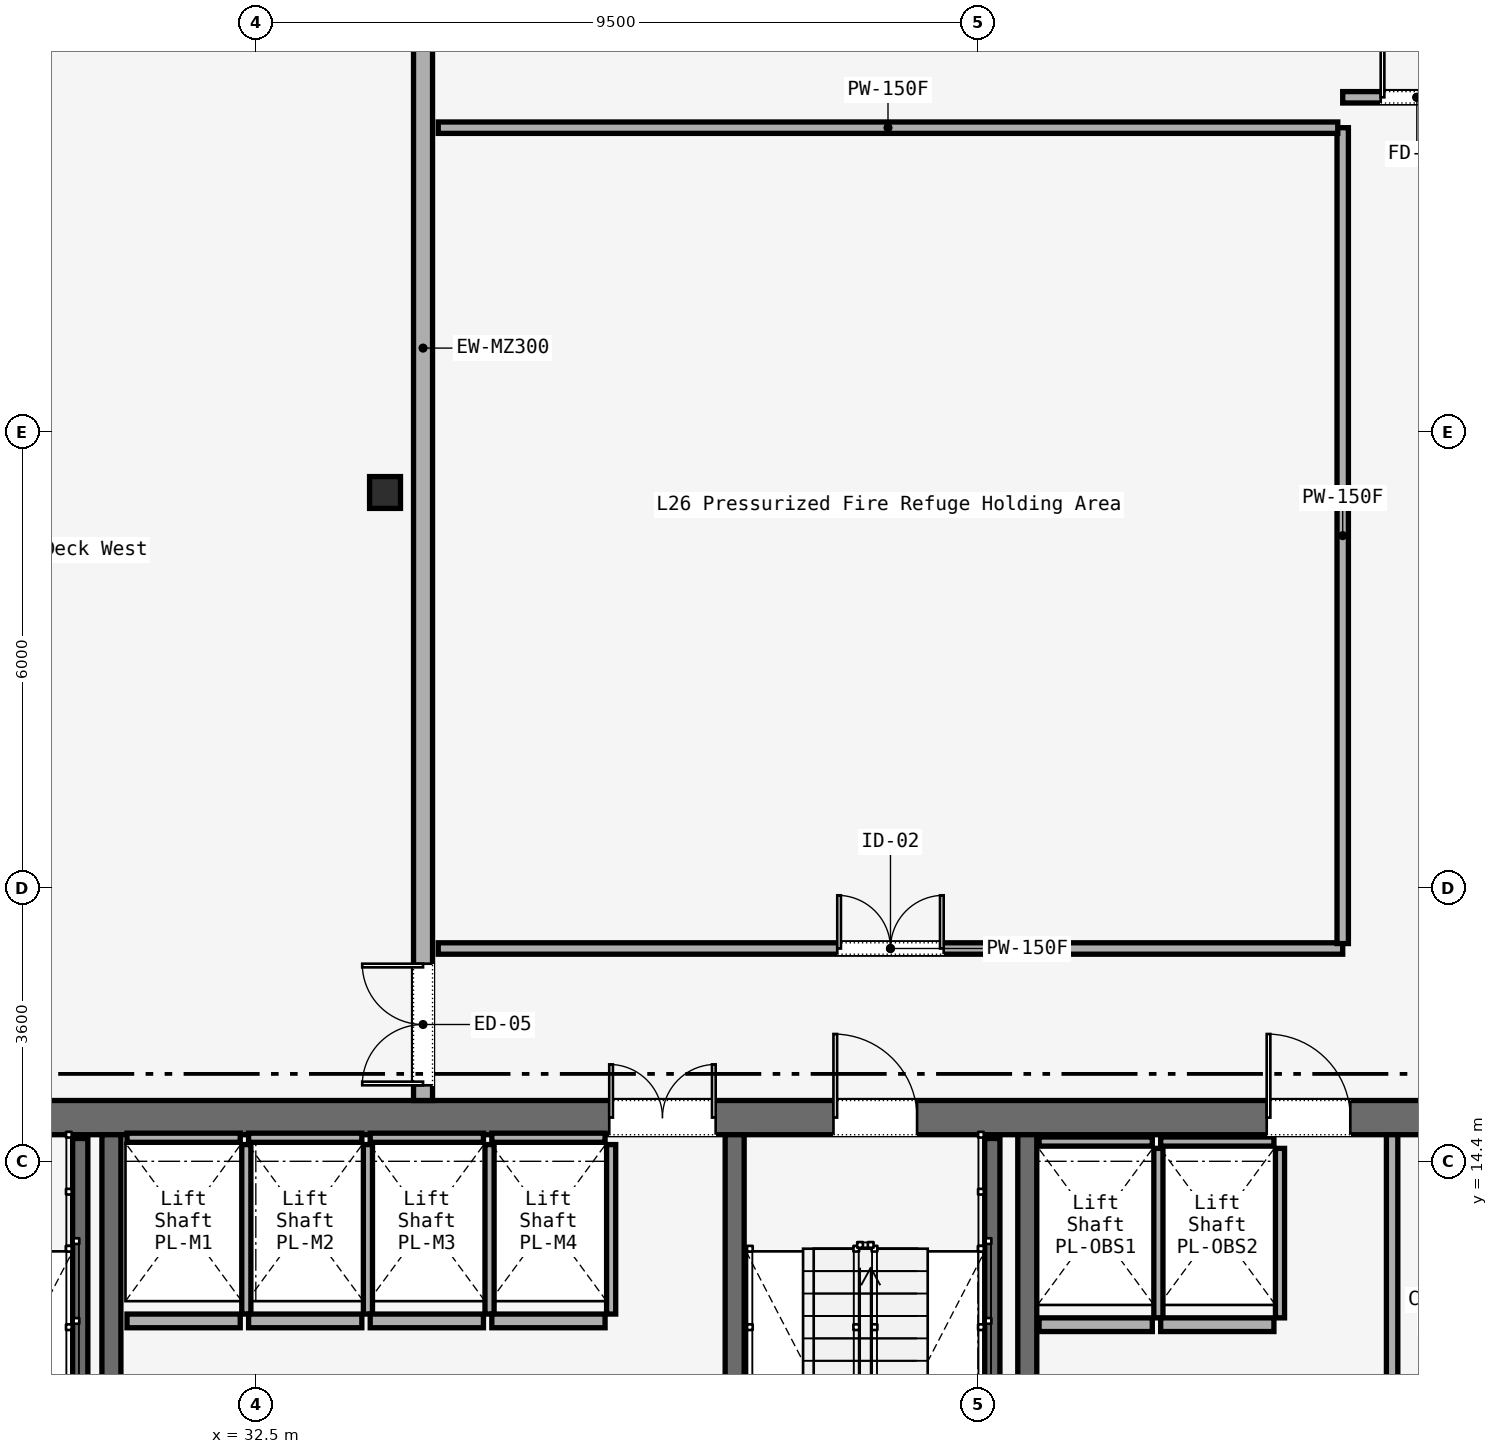
"""IFC4 building model, lengths in metres.
Left out: names, types, materials, properties, quantities, classifications, styles, units other than length and angle.
Written with IfcOpenShell. Run it as: python <this file> out.ifc"""

import sys

from ifc_helpers import new_model, si_unit, direction, frame, frame_2d, origin, origin_2d, place, context, subcontext, project, spatial, rectangle, i_section, extrude, element, fill, save


model = new_model("IFC4")
c1 = context("Model", 3, precision=1e-05, world=origin(), true_north=direction((0.0, 1.0)))
c2 = subcontext(c1, "Body", "Model", "MODEL_VIEW")
j1 = project(units=[si_unit("LENGTHUNIT", "METRE"), si_unit("PLANEANGLEUNIT", "RADIAN")], contexts=[c1])
p1 = place(None, origin())
s1 = spatial("IfcSite", under=j1, at=p1, CompositionType="ELEMENT")
p2 = place(p1, origin())
s2 = spatial("IfcBuilding", under=s1, at=p2, CompositionType="ELEMENT")
p3 = place(p2, frame((0.0, 0.0, 112.0)))
s3 = spatial("IfcBuildingStorey", under=s2, at=p3, CompositionType="ELEMENT", Elevation=112.0)
p4 = place(p3, frame((26.45, 14.975, 0.0), z_axis=(0.0, 0.0, 1.0), x_axis=(1.0, 0.0, 0.0)))
e1 = element("IfcWall", 1, at=p4, inside=s3, PredefinedType="SOLIDWALL", context=c2, shape_type="SweptSolid", body=[
    extrude(rectangle(XDim=31.1, YDim=0.45, at=frame_2d((15.55, 0.0))), origin(), (0.0, 0.0, 1.0), 5.12),
])
p5 = place(p4, frame((1.65, 0.0, 0.0)))
e2 = element("IfcOpeningElement", 2, at=p5, cuts=e1, PredefinedType="OPENING", context=c2, shape_type="SweptSolid", body=[
    extrude(rectangle(XDim=1.1, YDim=2.2, at=frame_2d((0.55, 1.1))), frame((0.0, 0.225, 0.0), z_axis=(0.0, -1.0, 0.0), x_axis=(1.0, 0.0, 0.0)), (0.0, 0.0, 1.0), 0.45),
])
p6 = place(p4, frame((13.65, 0.0, 0.0)))
e3 = element("IfcOpeningElement", 3, at=p6, cuts=e1, PredefinedType="OPENING", context=c2, shape_type="SweptSolid", body=[
    extrude(rectangle(XDim=1.1, YDim=2.2, at=frame_2d((0.55, 1.1))), frame((0.0, 0.225, 0.0), z_axis=(0.0, -1.0, 0.0), x_axis=(1.0, 0.0, 0.0)), (0.0, 0.0, 1.0), 0.45),
])
p7 = place(p4, frame((25.55, 0.0, 0.0)))
e4 = element("IfcOpeningElement", 4, at=p7, cuts=e1, PredefinedType="OPENING", context=c2, shape_type="SweptSolid", body=[
    extrude(rectangle(XDim=1.1, YDim=2.2, at=frame_2d((0.55, 1.1))), frame((0.0, 0.225, 0.0), z_axis=(0.0, -1.0, 0.0), x_axis=(1.0, 0.0, 0.0)), (0.0, 0.0, 1.0), 0.45),
])
p8 = place(p4, frame((10.7, 0.0, 0.0)))
e5 = element("IfcOpeningElement", 5, at=p8, cuts=e1, PredefinedType="OPENING", context=c2, shape_type="SweptSolid", body=[
    extrude(rectangle(XDim=1.4, YDim=2.2, at=frame_2d((0.7, 1.1))), frame((0.0, 0.225, 0.0), z_axis=(0.0, -1.0, 0.0), x_axis=(1.0, 0.0, 0.0)), (0.0, 0.0, 1.0), 0.45),
])
p9 = place(p4, frame((19.35, 0.0, 0.0)))
e6 = element("IfcOpeningElement", 6, at=p9, cuts=e1, PredefinedType="OPENING", context=c2, shape_type="SweptSolid", body=[
    extrude(rectangle(XDim=1.1, YDim=2.2, at=frame_2d((0.55, 1.1))), frame((0.0, 0.225, 0.0), z_axis=(0.0, -1.0, 0.0), x_axis=(1.0, 0.0, 0.0)), (0.0, 0.0, 1.0), 0.45),
])
p10 = place(p4, frame((21.4, 0.0, 0.0)))
e7 = element("IfcOpeningElement", 7, at=p10, cuts=e1, PredefinedType="OPENING", context=c2, shape_type="SweptSolid", body=[
    extrude(rectangle(XDim=0.9, YDim=2.1, at=frame_2d((0.45, 1.05))), frame((0.0, 0.225, 0.0), z_axis=(0.0, -1.0, 0.0), x_axis=(1.0, 0.0, 0.0)), (0.0, 0.0, 1.0), 0.45),
])
p11 = place(p4, frame((23.35, 0.0, 0.0)))
e8 = element("IfcOpeningElement", 8, at=p11, cuts=e1, PredefinedType="OPENING", context=c2, shape_type="SweptSolid", body=[
    extrude(rectangle(XDim=1.3, YDim=2.3, at=frame_2d((0.65, 1.15))), frame((0.0, 0.225, 0.0), z_axis=(0.0, -1.0, 0.0), x_axis=(1.0, 0.0, 0.0)), (0.0, 0.0, 1.0), 0.45),
])
for number, where, z_axis, x_axis in (
    (9, (30.6, 5.85, 0.0), (0.0, 0.0, 1.0), (0.0, 1.0, 0.0)),
    (10, (38.8, 5.85, 0.0), (0.0, 0.0, 1.0), (0.0, 1.0, 0.0)),
    (11, (42.65, 5.85, 0.0), (0.0, 0.0, 1.0), (0.0, 1.0, 0.0)),
):
    element("IfcWall", number, at=place(p3, frame(where, z_axis=z_axis, x_axis=x_axis)), inside=s3, PredefinedType="SOLIDWALL", context=c2, shape_type="SweptSolid", body=[
        extrude(rectangle(XDim=8.9, YDim=0.25, at=frame_2d((4.45, 0.0))), origin(), (0.0, 0.0, 1.0), 5.12),
    ])
p12 = place(p3, frame((34.2, 23.2, 0.0), z_axis=(0.0, 0.0, 1.0), x_axis=(1.0, 0.0, 0.0)))
e12 = element("IfcColumn", 12, at=p12, inside=s3, PredefinedType="COLUMN", context=c2, shape_type="SweptSolid", body=[
    extrude(i_section(OverallWidth=0.407, OverallDepth=0.419, WebThickness=0.031, FlangeThickness=0.049, FilletRadius=0.015, at=origin_2d()), origin(), (0.0, 0.0, 1.0), 5.12),
])
p13 = place(p3, frame((34.7, 15.2, 0.0), z_axis=(0.0, 0.0, 1.0), x_axis=(0.0, 1.0, 0.0)))
e13 = element("IfcWall", 13, at=p13, inside=s3, PredefinedType="SOLIDWALL", context=c2, shape_type="SweptSolid", body=[
    extrude(rectangle(XDim=19.8, YDim=0.25, at=frame_2d((9.9, 0.0))), origin(), (0.0, 0.0, 1.0), 3.99),
])
p14 = place(p13, frame((0.2, 0.0, 0.0)))
e14 = element("IfcOpeningElement", 14, at=p14, cuts=e13, PredefinedType="OPENING", context=c2, shape_type="SweptSolid", body=[
    extrude(rectangle(XDim=1.6, YDim=2.3, at=frame_2d((0.8, 1.15))), frame((0.0, 0.125, 0.0), z_axis=(0.0, -1.0, 0.0), x_axis=(1.0, 0.0, 0.0)), (0.0, 0.0, 1.0), 0.25),
])
for number, where, z_axis, x_axis in (
    (15, (30.19, 14.7, 0.0), (0.0, 0.0, 1.0), (0.0, -1.0, 0.0)),
    (16, (42.19, 14.7, 0.0), (0.0, 0.0, 1.0), (0.0, -1.0, 0.0)),
):
    element("IfcWall", number, at=place(p3, frame(where, z_axis=z_axis, x_axis=x_axis)), inside=s3, PredefinedType="SOLIDWALL", context=c2, shape_type="SweptSolid", body=[
        extrude(rectangle(XDim=7.65, YDim=0.2, at=frame_2d((3.825, 0.0))), origin(), (0.0, 0.0, 1.0), 5.4),
    ])
p15 = place(p3, frame((47.45, 5.9, 0.0), z_axis=(0.0, 0.0, 1.0), x_axis=(0.0, 1.0, 0.0)))
e17 = element("IfcWall", 17, at=p15, inside=s3, PredefinedType="PARTITIONING", context=c2, shape_type="SweptSolid", body=[
    extrude(rectangle(XDim=8.85, YDim=0.15, at=frame_2d((4.425, 0.0))), origin(), (0.0, 0.0, 1.0), 3.99),
])
p16 = place(p15, frame((2.75, 0.0, 0.0)))
e18 = element("IfcOpeningElement", 18, at=p16, cuts=e17, PredefinedType="OPENING", context=c2, shape_type="SweptSolid", body=[
    extrude(rectangle(XDim=0.9, YDim=2.1, at=frame_2d((0.45, 1.05))), frame((0.0, 0.075, 0.0), z_axis=(0.0, -1.0, 0.0), x_axis=(1.0, 0.0, 0.0)), (0.0, 0.0, 1.0), 0.15),
])
p17 = place(p3, frame((30.805, 12.3, 0.0), z_axis=(0.0, 0.0, 1.0), x_axis=(1.0, 0.0, 0.0)))
e19 = element("IfcWall", 19, at=p17, inside=s3, PredefinedType="SOLIDWALL", context=c2, shape_type="SweptSolid", body=[
    extrude(rectangle(XDim=1.49, YDim=0.18, at=frame_2d((0.745, 0.0))), origin(), (0.0, 0.0, 1.0), 3.99),
])
p18 = place(p3, frame((30.805, 14.71, 0.0), z_axis=(0.0, 0.0, 1.0), x_axis=(1.0, 0.0, 0.0)))
e20 = element("IfcWall", 20, at=p18, inside=s3, PredefinedType="SOLIDWALL", context=c2, shape_type="SweptSolid", body=[
    extrude(rectangle(XDim=1.49, YDim=0.12, at=frame_2d((0.745, 0.0))), origin(), (0.0, 0.0, 1.0), 3.99),
])
p19 = place(p3, frame((32.375, 12.39, 0.0), z_axis=(0.0, 0.0, 1.0), x_axis=(0.0, 1.0, 0.0)))
e21 = element("IfcWall", 21, at=p19, inside=s3, PredefinedType="SOLIDWALL", context=c2, shape_type="SweptSolid", body=[
    extrude(rectangle(XDim=2.23, YDim=0.12, at=frame_2d((1.115, 0.0))), origin(), (0.0, 0.0, 1.0), 3.99),
])
p20 = place(p3, frame((32.405, 12.3, 0.0), z_axis=(0.0, 0.0, 1.0), x_axis=(1.0, 0.0, 0.0)))
e22 = element("IfcWall", 22, at=p20, inside=s3, PredefinedType="SOLIDWALL", context=c2, shape_type="SweptSolid", body=[
    extrude(rectangle(XDim=1.49, YDim=0.18, at=frame_2d((0.745, 0.0))), origin(), (0.0, 0.0, 1.0), 3.99),
])
p21 = place(p3, frame((32.405, 14.71, 0.0), z_axis=(0.0, 0.0, 1.0), x_axis=(1.0, 0.0, 0.0)))
e23 = element("IfcWall", 23, at=p21, inside=s3, PredefinedType="SOLIDWALL", context=c2, shape_type="SweptSolid", body=[
    extrude(rectangle(XDim=1.49, YDim=0.12, at=frame_2d((0.745, 0.0))), origin(), (0.0, 0.0, 1.0), 3.99),
])
p22 = place(p3, frame((33.975, 12.39, 0.0), z_axis=(0.0, 0.0, 1.0), x_axis=(0.0, 1.0, 0.0)))
e24 = element("IfcWall", 24, at=p22, inside=s3, PredefinedType="SOLIDWALL", context=c2, shape_type="SweptSolid", body=[
    extrude(rectangle(XDim=2.23, YDim=0.12, at=frame_2d((1.115, 0.0))), origin(), (0.0, 0.0, 1.0), 3.99),
])
p23 = place(p3, frame((34.005, 12.3, 0.0), z_axis=(0.0, 0.0, 1.0), x_axis=(1.0, 0.0, 0.0)))
e25 = element("IfcWall", 25, at=p23, inside=s3, PredefinedType="SOLIDWALL", context=c2, shape_type="SweptSolid", body=[
    extrude(rectangle(XDim=1.49, YDim=0.18, at=frame_2d((0.745, 0.0))), origin(), (0.0, 0.0, 1.0), 3.99),
])
p24 = place(p3, frame((34.005, 14.71, 0.0), z_axis=(0.0, 0.0, 1.0), x_axis=(1.0, 0.0, 0.0)))
e26 = element("IfcWall", 26, at=p24, inside=s3, PredefinedType="SOLIDWALL", context=c2, shape_type="SweptSolid", body=[
    extrude(rectangle(XDim=1.49, YDim=0.12, at=frame_2d((0.745, 0.0))), origin(), (0.0, 0.0, 1.0), 3.99),
])
p25 = place(p3, frame((35.575, 12.39, 0.0), z_axis=(0.0, 0.0, 1.0), x_axis=(0.0, 1.0, 0.0)))
e27 = element("IfcWall", 27, at=p25, inside=s3, PredefinedType="SOLIDWALL", context=c2, shape_type="SweptSolid", body=[
    extrude(rectangle(XDim=2.23, YDim=0.12, at=frame_2d((1.115, 0.0))), origin(), (0.0, 0.0, 1.0), 3.99),
])
p26 = place(p3, frame((35.605, 12.3, 0.0), z_axis=(0.0, 0.0, 1.0), x_axis=(1.0, 0.0, 0.0)))
e28 = element("IfcWall", 28, at=p26, inside=s3, PredefinedType="SOLIDWALL", context=c2, shape_type="SweptSolid", body=[
    extrude(rectangle(XDim=1.49, YDim=0.18, at=frame_2d((0.745, 0.0))), origin(), (0.0, 0.0, 1.0), 3.99),
])
p27 = place(p3, frame((35.605, 14.71, 0.0), z_axis=(0.0, 0.0, 1.0), x_axis=(1.0, 0.0, 0.0)))
e29 = element("IfcWall", 29, at=p27, inside=s3, PredefinedType="SOLIDWALL", context=c2, shape_type="SweptSolid", body=[
    extrude(rectangle(XDim=1.49, YDim=0.12, at=frame_2d((0.745, 0.0))), origin(), (0.0, 0.0, 1.0), 3.99),
])
p28 = place(p3, frame((37.175, 12.39, 0.0), z_axis=(0.0, 0.0, 1.0), x_axis=(0.0, 1.0, 0.0)))
e30 = element("IfcWall", 30, at=p28, inside=s3, PredefinedType="SOLIDWALL", context=c2, shape_type="SweptSolid", body=[
    extrude(rectangle(XDim=2.23, YDim=0.12, at=frame_2d((1.115, 0.0))), origin(), (0.0, 0.0, 1.0), 3.99),
])
p29 = place(p3, frame((42.805, 12.25, 0.0), z_axis=(0.0, 0.0, 1.0), x_axis=(1.0, 0.0, 0.0)))
e31 = element("IfcWall", 31, at=p29, inside=s3, PredefinedType="SOLIDWALL", context=c2, shape_type="SweptSolid", body=[
    extrude(rectangle(XDim=1.49, YDim=0.18, at=frame_2d((0.745, 0.0))), origin(), (0.0, 0.0, 1.0), 3.99),
])
p30 = place(p3, frame((42.805, 14.66, 0.0), z_axis=(0.0, 0.0, 1.0), x_axis=(1.0, 0.0, 0.0)))
e32 = element("IfcWall", 32, at=p30, inside=s3, PredefinedType="SOLIDWALL", context=c2, shape_type="SweptSolid", body=[
    extrude(rectangle(XDim=1.49, YDim=0.12, at=frame_2d((0.745, 0.0))), origin(), (0.0, 0.0, 1.0), 3.99),
])
p31 = place(p3, frame((44.375, 12.34, 0.0), z_axis=(0.0, 0.0, 1.0), x_axis=(0.0, 1.0, 0.0)))
e33 = element("IfcWall", 33, at=p31, inside=s3, PredefinedType="SOLIDWALL", context=c2, shape_type="SweptSolid", body=[
    extrude(rectangle(XDim=2.23, YDim=0.12, at=frame_2d((1.115, 0.0))), origin(), (0.0, 0.0, 1.0), 3.99),
])
p32 = place(p3, frame((44.405, 12.25, 0.0), z_axis=(0.0, 0.0, 1.0), x_axis=(1.0, 0.0, 0.0)))
e34 = element("IfcWall", 34, at=p32, inside=s3, PredefinedType="SOLIDWALL", context=c2, shape_type="SweptSolid", body=[
    extrude(rectangle(XDim=1.49, YDim=0.18, at=frame_2d((0.745, 0.0))), origin(), (0.0, 0.0, 1.0), 3.99),
])
p33 = place(p3, frame((44.405, 14.66, 0.0), z_axis=(0.0, 0.0, 1.0), x_axis=(1.0, 0.0, 0.0)))
e35 = element("IfcWall", 35, at=p33, inside=s3, PredefinedType="SOLIDWALL", context=c2, shape_type="SweptSolid", body=[
    extrude(rectangle(XDim=1.49, YDim=0.12, at=frame_2d((0.745, 0.0))), origin(), (0.0, 0.0, 1.0), 3.99),
])
p34 = place(p3, frame((45.975, 12.34, 0.0), z_axis=(0.0, 0.0, 1.0), x_axis=(0.0, 1.0, 0.0)))
e36 = element("IfcWall", 36, at=p34, inside=s3, PredefinedType="SOLIDWALL", context=c2, shape_type="SweptSolid", body=[
    extrude(rectangle(XDim=2.23, YDim=0.12, at=frame_2d((1.115, 0.0))), origin(), (0.0, 0.0, 1.0), 3.99),
])
p35 = place(p3, frame((34.9, 17.2, 0.0), z_axis=(0.0, 0.0, 1.0), x_axis=(1.0, 0.0, 0.0)))
e37 = element("IfcWall", 37, at=p35, inside=s3, PredefinedType="PARTITIONING", context=c2, shape_type="SweptSolid", body=[
    extrude(rectangle(XDim=11.9, YDim=0.15, at=frame_2d((5.95, 0.0))), origin(), (0.0, 0.0, 1.0), 3.99),
])
p36 = place(p35, frame((5.25, 0.0, 0.0)))
e38 = element("IfcOpeningElement", 38, at=p36, cuts=e37, PredefinedType="OPENING", context=c2, shape_type="SweptSolid", body=[
    extrude(rectangle(XDim=1.4, YDim=2.2, at=frame_2d((0.7, 1.1))), frame((0.0, 0.075, 0.0), z_axis=(0.0, -1.0, 0.0), x_axis=(1.0, 0.0, 0.0)), (0.0, 0.0, 1.0), 0.15),
])
p37 = place(p3, frame((46.8, 17.265, 0.0), z_axis=(0.0, 0.0, 1.0), x_axis=(0.0, 1.0, 0.0)))
e39 = element("IfcWall", 39, at=p37, inside=s3, PredefinedType="PARTITIONING", context=c2, shape_type="SweptSolid", body=[
    extrude(rectangle(XDim=10.735, YDim=0.15, at=frame_2d((5.368, 0.0))), origin(), (0.0, 0.0, 1.0), 3.99),
])
p38 = place(p3, frame((46.8, 28.4, 0.0), z_axis=(0.0, 0.0, 1.0), x_axis=(1.0, 0.0, 0.0)))
e40 = element("IfcWall", 40, at=p38, inside=s3, PredefinedType="PARTITIONING", context=c2, shape_type="SweptSolid", body=[
    extrude(rectangle(XDim=1.95, YDim=0.15, at=frame_2d((0.975, 0.0))), origin(), (0.0, 0.0, 1.0), 3.99),
])
p39 = place(p38, frame((0.5, 0.0, 0.0)))
e41 = element("IfcOpeningElement", 41, at=p39, cuts=e40, PredefinedType="OPENING", context=c2, shape_type="SweptSolid", body=[
    extrude(rectangle(XDim=0.95, YDim=2.2, at=frame_2d((0.475, 1.1))), frame((0.0, 0.075, 0.0), z_axis=(0.0, -1.0, 0.0), x_axis=(1.0, 0.0, 0.0)), (0.0, 0.0, 1.0), 0.15),
])
p40 = place(p3, frame((34.9, 28.0, 0.0), z_axis=(0.0, 0.0, 1.0), x_axis=(1.0, 0.0, 0.0)))
e42 = element("IfcWall", 42, at=p40, inside=s3, PredefinedType="PARTITIONING", context=c2, shape_type="SweptSolid", body=[
    extrude(rectangle(XDim=11.835, YDim=0.15, at=frame_2d((5.917, 0.0))), origin(), (0.0, 0.0, 1.0), 3.99),
])
p41 = place(p14, origin())
e43 = element("IfcDoor", 43, at=p41, inside=s3, OperationType="DOUBLE_DOOR_SINGLE_SWING", PredefinedType="DOOR", context=c2, shape_type="SweptSolid", body=[
    extrude(rectangle(XDim=1.6, YDim=2.3, at=frame_2d((0.8, 1.15))), frame((0.0, 0.025, 0.0), z_axis=(0.0, -1.0, 0.0), x_axis=(1.0, 0.0, 0.0)), (0.0, 0.0, 1.0), 0.05),
])
fill(e14, e43)
p42 = place(p6, origin())
e44 = element("IfcDoor", 44, at=p42, inside=s3, OperationType="SINGLE_SWING_RIGHT", PredefinedType="DOOR", context=c2, shape_type="SweptSolid", body=[
    extrude(rectangle(XDim=1.1, YDim=2.2, at=frame_2d((0.55, 1.1))), frame((0.0, 0.025, 0.0), z_axis=(0.0, -1.0, 0.0), x_axis=(1.0, 0.0, 0.0)), (0.0, 0.0, 1.0), 0.05),
])
fill(e3, e44)
p43 = place(p8, origin())
e45 = element("IfcDoor", 45, at=p43, inside=s3, OperationType="DOUBLE_DOOR_SINGLE_SWING", PredefinedType="DOOR", context=c2, shape_type="SweptSolid", body=[
    extrude(rectangle(XDim=1.4, YDim=2.2, at=frame_2d((0.7, 1.1))), frame((0.0, 0.025, 0.0), z_axis=(0.0, -1.0, 0.0), x_axis=(1.0, 0.0, 0.0)), (0.0, 0.0, 1.0), 0.05),
])
fill(e5, e45)
p44 = place(p9, origin())
e46 = element("IfcDoor", 46, at=p44, inside=s3, OperationType="SINGLE_SWING_LEFT", PredefinedType="DOOR", context=c2, shape_type="SweptSolid", body=[
    extrude(rectangle(XDim=1.1, YDim=2.2, at=frame_2d((0.55, 1.1))), frame((0.0, 0.025, 0.0), z_axis=(0.0, -1.0, 0.0), x_axis=(1.0, 0.0, 0.0)), (0.0, 0.0, 1.0), 0.05),
])
fill(e6, e46)
p45 = place(p36, origin())
e47 = element("IfcDoor", 47, at=p45, inside=s3, OperationType="SINGLE_SWING_LEFT", PredefinedType="DOOR", context=c2, shape_type="SweptSolid", body=[
    extrude(rectangle(XDim=1.4, YDim=2.2, at=frame_2d((0.7, 1.1))), frame((0.0, 0.025, 0.0), z_axis=(0.0, -1.0, 0.0), x_axis=(1.0, 0.0, 0.0)), (0.0, 0.0, 1.0), 0.05),
])
fill(e38, e47)
p46 = place(p39, origin())
e48 = element("IfcDoor", 48, at=p46, inside=s3, OperationType="SINGLE_SWING_RIGHT", PredefinedType="DOOR", context=c2, shape_type="SweptSolid", body=[
    extrude(rectangle(XDim=0.95, YDim=2.2, at=frame_2d((0.475, 1.1))), frame((0.0, 0.025, 0.0), z_axis=(0.0, -1.0, 0.0), x_axis=(1.0, 0.0, 0.0)), (0.0, 0.0, 1.0), 0.05),
])
fill(e41, e48)
save(model, sys.argv[1])
